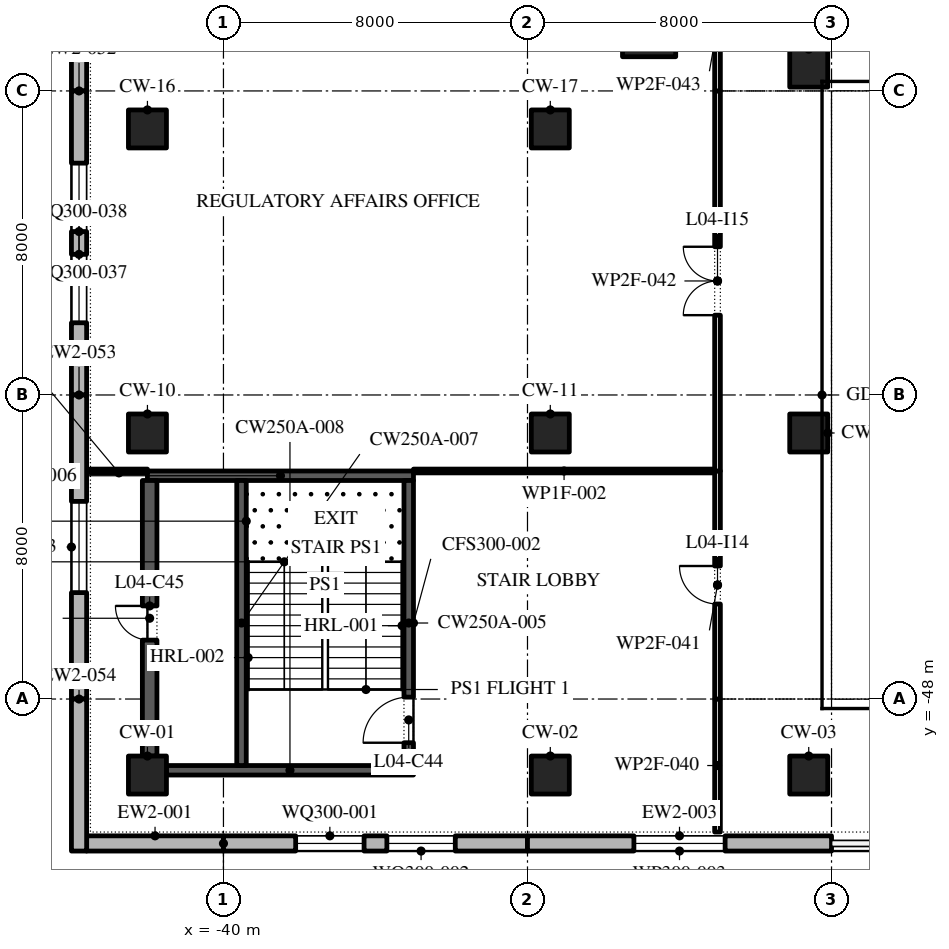
"""IFC4 building model, lengths in metres.
Left out: names, types, materials, properties, quantities, classifications, styles, units other than length and angle.
Written with IfcOpenShell. Run it as: python <this file> out.ifc"""

import sys

from ifc_helpers import new_model, si_unit, direction, frame, frame_2d, origin, origin_2d, place, context, subcontext, project, spatial, polyline, rectangle, outline, extrude, element, fill, save


model = new_model("IFC4")
c1 = context("Model", 3, precision=1e-05, world=origin(), true_north=direction((0.0, 1.0)))
c2 = subcontext(c1, "Body", "Model", "MODEL_VIEW")
j1 = project(units=[si_unit("LENGTHUNIT", "METRE"), si_unit("PLANEANGLEUNIT", "RADIAN")], contexts=[c1])
p1 = place(None, origin())
s1 = spatial("IfcSite", under=j1, at=p1, CompositionType="ELEMENT")
p2 = place(p1, origin())
s2 = spatial("IfcBuilding", under=s1, at=p2, CompositionType="ELEMENT")
p3 = place(p2, frame((0.0, 0.0, 24.0)))
s3 = spatial("IfcBuildingStorey", under=s2, at=p3, CompositionType="ELEMENT", Elevation=24.0)
for number, where, z_axis, x_axis in (
    (1, (-42.0, -50.0, 0.0), (0.0, 0.0, 1.0), (1.0, 0.0, 0.0)),
    (2, (-31.4, -50.0, 0.0), (0.0, 0.0, 1.0), (1.0, 0.0, 0.0)),
    (3, (-24.6, -50.0, 0.0), (0.0, 0.0, 1.0), (1.0, 0.0, 0.0)),
    (4, (-42.0, -41.0, 0.0), (0.0, 0.0, 1.0), (1.0, 0.0, 0.0)),
    (5, (-31.4, -41.0, 0.0), (0.0, 0.0, 1.0), (1.0, 0.0, 0.0)),
    (6, (-24.6, -41.0, 0.0), (0.0, 0.0, 1.0), (1.0, 0.0, 0.0)),
    (7, (-42.0, -33.0, 0.0), (0.0, 0.0, 1.0), (1.0, 0.0, 0.0)),
    (8, (-31.4, -33.0, 0.0), (0.0, 0.0, 1.0), (1.0, 0.0, 0.0)),
    (9, (-24.6, -31.4, 0.0), (0.0, 0.0, 1.0), (1.0, 0.0, 0.0)),
):
    element("IfcColumn", number, at=place(p3, frame(where, z_axis=z_axis, x_axis=x_axis)), inside=s3, PredefinedType="COLUMN", context=c2, shape_type="SweptSolid", body=[
        extrude(rectangle(XDim=1.0, YDim=1.0, at=origin_2d()), origin(), (0.0, 0.0, 1.0), 4.8),
    ])
p4 = place(p3, frame((-28.8, -30.4, 0.0), z_axis=(0.0, 0.0, 1.0), x_axis=(1.0, 0.0, 0.0)))
e10 = element("IfcColumn", 10, at=p4, inside=s3, PredefinedType="COLUMN", context=c2, shape_type="SweptSolid", body=[
    extrude(rectangle(XDim=1.4, YDim=1.4, at=origin_2d()), origin(), (0.0, 0.0, 1.0), 4.8),
])
p5 = place(p3, frame((-43.6, -51.8, 0.0), z_axis=(0.0, 0.0, 1.0), x_axis=(1.0, 0.0, 0.0)))
e11 = element("IfcWall", 11, at=p5, inside=s3, PredefinedType="STANDARD", context=c2, shape_type="SweptSolid", body=[
    extrude(rectangle(XDim=3.6, YDim=0.4, at=frame_2d((1.8, 0.0))), origin(), (0.0, 0.0, 1.0), 4.5),
])
p6 = place(p3, frame((-40.0, -51.8, 0.0), z_axis=(0.0, 0.0, 1.0), x_axis=(1.0, 0.0, 0.0)))
e12 = element("IfcWall", 12, at=p6, inside=s3, PredefinedType="STANDARD", context=c2, shape_type="SweptSolid", body=[
    extrude(rectangle(XDim=8.0, YDim=0.4, at=frame_2d((4.0, 0.0))), origin(), (0.0, 0.0, 1.0), 4.5),
])
p7 = place(p6, frame((1.9, 0.0, 0.9)))
e13 = element("IfcOpeningElement", 13, at=p7, cuts=e12, PredefinedType="OPENING", context=c2, shape_type="SweptSolid", body=[
    extrude(outline(polyline([(0.0, 0.0), (1.8, 0.0), (1.8, 1.5), (1.785, 1.729), (1.738, 1.954), (1.662, 2.17), (1.558, 2.375), (1.427, 2.563), (1.271, 2.732), (1.095, 2.879), (0.9, 3.0), (0.705, 2.879), (0.529, 2.732), (0.373, 2.563), (0.242, 2.375), (0.138, 2.17), (0.062, 1.954), (0.015, 1.729), (0.0, 1.5), (0.0, 0.0)])), frame((0.0, 0.21, 0.0), z_axis=(0.0, -1.0, 0.0), x_axis=(1.0, 0.0, 0.0)), (0.0, 0.0, 1.0), 0.42),
])
p8 = place(p6, frame((4.3, 0.0, 0.9)))
e14 = element("IfcOpeningElement", 14, at=p8, cuts=e12, PredefinedType="OPENING", context=c2, shape_type="SweptSolid", body=[
    extrude(outline(polyline([(0.0, 0.0), (1.8, 0.0), (1.8, 1.5), (1.785, 1.729), (1.738, 1.954), (1.662, 2.17), (1.558, 2.375), (1.427, 2.563), (1.271, 2.732), (1.095, 2.879), (0.9, 3.0), (0.705, 2.879), (0.529, 2.732), (0.373, 2.563), (0.242, 2.375), (0.138, 2.17), (0.062, 1.954), (0.015, 1.729), (0.0, 1.5), (0.0, 0.0)])), frame((0.0, 0.21, 0.0), z_axis=(0.0, -1.0, 0.0), x_axis=(1.0, 0.0, 0.0)), (0.0, 0.0, 1.0), 0.42),
])
p9 = place(p3, frame((-32.0, -51.8, 0.0), z_axis=(0.0, 0.0, 1.0), x_axis=(1.0, 0.0, 0.0)))
e15 = element("IfcWall", 15, at=p9, inside=s3, PredefinedType="STANDARD", context=c2, shape_type="SweptSolid", body=[
    extrude(rectangle(XDim=8.0, YDim=0.4, at=frame_2d((4.0, 0.0))), origin(), (0.0, 0.0, 1.0), 4.5),
])
p10 = place(p9, frame((2.8, 0.0, 0.9)))
e16 = element("IfcOpeningElement", 16, at=p10, cuts=e15, PredefinedType="OPENING", context=c2, shape_type="SweptSolid", body=[
    extrude(outline(polyline([(0.0, 0.0), (2.4, 0.0), (2.4, 1.5), (2.378, 1.758), (2.313, 2.009), (2.207, 2.245), (2.063, 2.46), (1.885, 2.648), (1.677, 2.804), (1.447, 2.922), (1.2, 3.0), (0.953, 2.922), (0.722, 2.804), (0.515, 2.648), (0.337, 2.46), (0.193, 2.245), (0.087, 2.009), (0.022, 1.758), (0.0, 1.5), (0.0, 0.0)])), frame((0.0, 0.21, 0.0), z_axis=(0.0, -1.0, 0.0), x_axis=(1.0, 0.0, 0.0)), (0.0, 0.0, 1.0), 0.42),
])
p11 = place(p3, frame((-43.8, -24.0, 0.0), z_axis=(0.0, 0.0, 1.0), x_axis=(0.0, -1.0, 0.0)))
e17 = element("IfcWall", 17, at=p11, inside=s3, PredefinedType="STANDARD", context=c2, shape_type="SweptSolid", body=[
    extrude(rectangle(XDim=8.0, YDim=0.4, at=frame_2d((4.0, 0.0))), origin(), (0.0, 0.0, 1.0), 4.5),
])
p12 = place(p11, frame((2.8, 0.0, 0.9)))
e18 = element("IfcOpeningElement", 18, at=p12, cuts=e17, PredefinedType="OPENING", context=c2, shape_type="SweptSolid", body=[
    extrude(outline(polyline([(0.0, 0.0), (2.4, 0.0), (2.4, 1.5), (2.378, 1.758), (2.313, 2.009), (2.207, 2.245), (2.063, 2.46), (1.885, 2.648), (1.677, 2.804), (1.447, 2.922), (1.2, 3.0), (0.953, 2.922), (0.722, 2.804), (0.515, 2.648), (0.337, 2.46), (0.193, 2.245), (0.087, 2.009), (0.022, 1.758), (0.0, 1.5), (0.0, 0.0)])), frame((0.0, 0.21, 0.0), z_axis=(0.0, -1.0, 0.0), x_axis=(1.0, 0.0, 0.0)), (0.0, 0.0, 1.0), 0.42),
])
p13 = place(p3, frame((-43.8, -32.0, 0.0), z_axis=(0.0, 0.0, 1.0), x_axis=(0.0, -1.0, 0.0)))
e19 = element("IfcWall", 19, at=p13, inside=s3, PredefinedType="STANDARD", context=c2, shape_type="SweptSolid", body=[
    extrude(rectangle(XDim=8.0, YDim=0.4, at=frame_2d((4.0, 0.0))), origin(), (0.0, 0.0, 1.0), 4.5),
])
p14 = place(p13, frame((1.9, 0.0, 0.9)))
e20 = element("IfcOpeningElement", 20, at=p14, cuts=e19, PredefinedType="OPENING", context=c2, shape_type="SweptSolid", body=[
    extrude(outline(polyline([(0.0, 0.0), (1.8, 0.0), (1.8, 1.5), (1.785, 1.729), (1.738, 1.954), (1.662, 2.17), (1.558, 2.375), (1.427, 2.563), (1.271, 2.732), (1.095, 2.879), (0.9, 3.0), (0.705, 2.879), (0.529, 2.732), (0.373, 2.563), (0.242, 2.375), (0.138, 2.17), (0.062, 1.954), (0.015, 1.729), (0.0, 1.5), (0.0, 0.0)])), frame((0.0, 0.21, 0.0), z_axis=(0.0, -1.0, 0.0), x_axis=(1.0, 0.0, 0.0)), (0.0, 0.0, 1.0), 0.42),
])
p15 = place(p13, frame((4.3, 0.0, 0.9)))
e21 = element("IfcOpeningElement", 21, at=p15, cuts=e19, PredefinedType="OPENING", context=c2, shape_type="SweptSolid", body=[
    extrude(outline(polyline([(0.0, 0.0), (1.8, 0.0), (1.8, 1.5), (1.785, 1.729), (1.738, 1.954), (1.662, 2.17), (1.558, 2.375), (1.427, 2.563), (1.271, 2.732), (1.095, 2.879), (0.9, 3.0), (0.705, 2.879), (0.529, 2.732), (0.373, 2.563), (0.242, 2.375), (0.138, 2.17), (0.062, 1.954), (0.015, 1.729), (0.0, 1.5), (0.0, 0.0)])), frame((0.0, 0.21, 0.0), z_axis=(0.0, -1.0, 0.0), x_axis=(1.0, 0.0, 0.0)), (0.0, 0.0, 1.0), 0.42),
])
p16 = place(p3, frame((-43.8, -40.0, 0.0), z_axis=(0.0, 0.0, 1.0), x_axis=(0.0, -1.0, 0.0)))
e22 = element("IfcWall", 22, at=p16, inside=s3, PredefinedType="STANDARD", context=c2, shape_type="SweptSolid", body=[
    extrude(rectangle(XDim=8.0, YDim=0.4, at=frame_2d((4.0, 0.0))), origin(), (0.0, 0.0, 1.0), 4.5),
])
p17 = place(p16, frame((2.8, 0.0, 0.9)))
e23 = element("IfcOpeningElement", 23, at=p17, cuts=e22, PredefinedType="OPENING", context=c2, shape_type="SweptSolid", body=[
    extrude(outline(polyline([(0.0, 0.0), (2.4, 0.0), (2.4, 1.5), (2.378, 1.758), (2.313, 2.009), (2.207, 2.245), (2.063, 2.46), (1.885, 2.648), (1.677, 2.804), (1.447, 2.922), (1.2, 3.0), (0.953, 2.922), (0.722, 2.804), (0.515, 2.648), (0.337, 2.46), (0.193, 2.245), (0.087, 2.009), (0.022, 1.758), (0.0, 1.5), (0.0, 0.0)])), frame((0.0, 0.21, 0.0), z_axis=(0.0, -1.0, 0.0), x_axis=(1.0, 0.0, 0.0)), (0.0, 0.0, 1.0), 0.42),
])
p18 = place(p3, frame((-43.8, -48.0, 0.0), z_axis=(0.0, 0.0, 1.0), x_axis=(0.0, -1.0, 0.0)))
e24 = element("IfcWall", 24, at=p18, inside=s3, PredefinedType="STANDARD", context=c2, shape_type="SweptSolid", body=[
    extrude(rectangle(XDim=4.0, YDim=0.4, at=frame_2d((2.0, 0.0))), origin(), (0.0, 0.0, 1.0), 4.5),
])
p19 = place(p3, frame((-41.5, -49.875, 0.0), z_axis=(0.0, 0.0, 1.0), x_axis=(1.0, 0.0, 0.0)))
e25 = element("IfcWall", 25, at=p19, inside=s3, PredefinedType="SHEAR", context=c2, shape_type="SweptSolid", body=[
    extrude(rectangle(XDim=6.5, YDim=0.25, at=frame_2d((3.25, 0.0))), origin(), (0.0, 0.0, 1.0), 4.5),
])
p20 = place(p3, frame((-42.0, -42.125, 0.0), z_axis=(0.0, 0.0, 1.0), x_axis=(1.0, 0.0, 0.0)))
e26 = element("IfcWall", 26, at=p20, inside=s3, PredefinedType="SHEAR", context=c2, shape_type="SweptSolid", body=[
    extrude(rectangle(XDim=7.0, YDim=0.25, at=frame_2d((3.5, 0.0))), origin(), (0.0, 0.0, 1.0), 4.5),
])
p21 = place(p3, frame((-41.942, -49.5, 0.0), z_axis=(0.0, 0.0, 1.0), x_axis=(0.0, 1.0, 0.0)))
e27 = element("IfcWall", 27, at=p21, inside=s3, PredefinedType="SHEAR", context=c2, shape_type="SweptSolid", body=[
    extrude(rectangle(XDim=7.25, YDim=0.384, at=frame_2d((3.625, 0.0))), origin(), (0.0, 0.0, 1.0), 4.5),
])
p22 = place(p21, frame((3.05, 0.0, 0.0)))
e28 = element("IfcOpeningElement", 28, at=p22, cuts=e27, PredefinedType="OPENING", context=c2, shape_type="SweptSolid", body=[
    extrude(rectangle(XDim=0.9, YDim=2.1, at=frame_2d((0.45, 1.05))), frame((0.0, 0.202, 0.0), z_axis=(0.0, -1.0, 0.0), x_axis=(1.0, 0.0, 0.0)), (0.0, 0.0, 1.0), 0.404),
])
p23 = place(p3, frame((-35.125, -49.75, 0.0), z_axis=(0.0, 0.0, 1.0), x_axis=(0.0, 1.0, 0.0)))
e29 = element("IfcWall", 29, at=p23, inside=s3, PredefinedType="SHEAR", context=c2, shape_type="SweptSolid", body=[
    extrude(rectangle(XDim=7.5, YDim=0.25, at=frame_2d((3.75, 0.0))), origin(), (0.0, 0.0, 1.0), 4.5),
])
p24 = place(p23, frame((0.6, 0.0, 0.0)))
e30 = element("IfcOpeningElement", 30, at=p24, cuts=e29, PredefinedType="OPENING", context=c2, shape_type="SweptSolid", body=[
    extrude(rectangle(XDim=1.2, YDim=2.1, at=frame_2d((0.6, 1.05))), frame((0.0, 0.135, 0.0), z_axis=(0.0, -1.0, 0.0), x_axis=(1.0, 0.0, 0.0)), (0.0, 0.0, 1.0), 0.27),
])
p25 = place(p3, frame((-39.525, -49.75, 0.0), z_axis=(0.0, 0.0, 1.0), x_axis=(0.0, 1.0, 0.0)))
e31 = element("IfcWall", 31, at=p25, inside=s3, PredefinedType="SHEAR", context=c2, shape_type="SweptSolid", body=[
    extrude(rectangle(XDim=7.5, YDim=0.25, at=frame_2d((3.75, 0.0))), origin(), (0.0, 0.0, 1.0), 4.5),
])
p26 = place(p3, frame((-43.5, -42.0, 0.0), z_axis=(0.0, 0.0, 1.0), x_axis=(1.0, 0.0, 0.0)))
e32 = element("IfcWall", 32, at=p26, inside=s3, PredefinedType="PARTITIONING", context=c2, shape_type="SweptSolid", body=[
    extrude(rectangle(XDim=1.5, YDim=0.1, at=frame_2d((0.75, 0.0))), origin(), (0.0, 0.0, 1.0), 4.5),
])
p27 = place(p3, frame((-35.0, -42.0, 0.0), z_axis=(0.0, 0.0, 1.0), x_axis=(1.0, 0.0, 0.0)))
e33 = element("IfcWall", 33, at=p27, inside=s3, PredefinedType="PARTITIONING", context=c2, shape_type="SweptSolid", body=[
    extrude(rectangle(XDim=7.925, YDim=0.1, at=frame_2d((3.962, 0.0))), origin(), (0.0, 0.0, 1.0), 4.5),
])
p28 = place(p3, frame((-27.0, -51.5, 0.0), z_axis=(0.0, 0.0, 1.0), x_axis=(0.0, 1.0, 0.0)))
e34 = element("IfcWall", 34, at=p28, inside=s3, PredefinedType="PARTITIONING", context=c2, shape_type="SweptSolid", body=[
    extrude(rectangle(XDim=3.5, YDim=0.15, at=frame_2d((1.75, 0.0))), origin(), (0.0, 0.0, 1.0), 4.5),
])
p29 = place(p3, frame((-27.0, -48.0, 0.0), z_axis=(0.0, 0.0, 1.0), x_axis=(0.0, 1.0, 0.0)))
e35 = element("IfcWall", 35, at=p29, inside=s3, PredefinedType="PARTITIONING", context=c2, shape_type="SweptSolid", body=[
    extrude(rectangle(XDim=6.0, YDim=0.15, at=frame_2d((3.0, 0.0))), origin(), (0.0, 0.0, 1.0), 4.5),
])
p30 = place(p29, frame((2.5, 0.0, 0.0)))
e36 = element("IfcOpeningElement", 36, at=p30, cuts=e35, PredefinedType="OPENING", context=c2, shape_type="SweptSolid", body=[
    extrude(rectangle(XDim=1.0, YDim=2.1, at=frame_2d((0.5, 1.05))), frame((0.0, 0.085, 0.0), z_axis=(0.0, -1.0, 0.0), x_axis=(1.0, 0.0, 0.0)), (0.0, 0.0, 1.0), 0.17),
])
p31 = place(p3, frame((-27.0, -42.0, 0.0), z_axis=(0.0, 0.0, 1.0), x_axis=(0.0, 1.0, 0.0)))
e37 = element("IfcWall", 37, at=p31, inside=s3, PredefinedType="PARTITIONING", context=c2, shape_type="SweptSolid", body=[
    extrude(rectangle(XDim=10.0, YDim=0.15, at=frame_2d((5.0, 0.0))), origin(), (0.0, 0.0, 1.0), 4.5),
])
p32 = place(p31, frame((4.1, 0.0, 0.0)))
e38 = element("IfcOpeningElement", 38, at=p32, cuts=e37, PredefinedType="OPENING", context=c2, shape_type="SweptSolid", body=[
    extrude(rectangle(XDim=1.8, YDim=2.1, at=frame_2d((0.9, 1.05))), frame((0.0, 0.085, 0.0), z_axis=(0.0, -1.0, 0.0), x_axis=(1.0, 0.0, 0.0)), (0.0, 0.0, 1.0), 0.17),
])
p33 = place(p3, frame((-27.0, -32.0, 0.0), z_axis=(0.0, 0.0, 1.0), x_axis=(0.0, 1.0, 0.0)))
e39 = element("IfcWall", 39, at=p33, inside=s3, PredefinedType="PARTITIONING", context=c2, shape_type="SweptSolid", body=[
    extrude(rectangle(XDim=3.425, YDim=0.15, at=frame_2d((1.712, 0.0))), origin(), (0.0, 0.0, 1.0), 4.5),
])
p34 = place(p7, origin())
e40 = element("IfcWindow", 40, at=p34, inside=s3, PartitioningType="DOUBLE_PANEL_VERTICAL", PredefinedType="WINDOW", context=c2, shape_type="SweptSolid", body=[
    extrude(outline(polyline([(0.0, 0.0), (1.8, 0.0), (1.8, 1.5), (1.785, 1.729), (1.738, 1.954), (1.662, 2.17), (1.558, 2.375), (1.427, 2.563), (1.271, 2.732), (1.095, 2.879), (0.9, 3.0), (0.705, 2.879), (0.529, 2.732), (0.373, 2.563), (0.242, 2.375), (0.138, 2.17), (0.062, 1.954), (0.015, 1.729), (0.0, 1.5), (0.0, 0.0)])), frame((0.0, 0.03, 0.0), z_axis=(0.0, -1.0, 0.0), x_axis=(1.0, 0.0, 0.0)), (0.0, 0.0, 1.0), 0.06),
])
fill(e13, e40)
p35 = place(p8, origin())
e41 = element("IfcWindow", 41, at=p35, inside=s3, PartitioningType="DOUBLE_PANEL_VERTICAL", PredefinedType="WINDOW", context=c2, shape_type="SweptSolid", body=[
    extrude(outline(polyline([(0.0, 0.0), (1.8, 0.0), (1.8, 1.5), (1.785, 1.729), (1.738, 1.954), (1.662, 2.17), (1.558, 2.375), (1.427, 2.563), (1.271, 2.732), (1.095, 2.879), (0.9, 3.0), (0.705, 2.879), (0.529, 2.732), (0.373, 2.563), (0.242, 2.375), (0.138, 2.17), (0.062, 1.954), (0.015, 1.729), (0.0, 1.5), (0.0, 0.0)])), frame((0.0, 0.03, 0.0), z_axis=(0.0, -1.0, 0.0), x_axis=(1.0, 0.0, 0.0)), (0.0, 0.0, 1.0), 0.06),
])
fill(e14, e41)
p36 = place(p10, origin())
e42 = element("IfcWindow", 42, at=p36, inside=s3, PartitioningType="DOUBLE_PANEL_VERTICAL", PredefinedType="WINDOW", context=c2, shape_type="SweptSolid", body=[
    extrude(outline(polyline([(0.0, 0.0), (2.4, 0.0), (2.4, 1.5), (2.378, 1.758), (2.313, 2.009), (2.207, 2.245), (2.063, 2.46), (1.885, 2.648), (1.677, 2.804), (1.447, 2.922), (1.2, 3.0), (0.953, 2.922), (0.722, 2.804), (0.515, 2.648), (0.337, 2.46), (0.193, 2.245), (0.087, 2.009), (0.022, 1.758), (0.0, 1.5), (0.0, 0.0)])), frame((0.0, 0.03, 0.0), z_axis=(0.0, -1.0, 0.0), x_axis=(1.0, 0.0, 0.0)), (0.0, 0.0, 1.0), 0.06),
])
fill(e16, e42)
p37 = place(p14, origin())
e43 = element("IfcWindow", 43, at=p37, inside=s3, PartitioningType="DOUBLE_PANEL_VERTICAL", PredefinedType="WINDOW", context=c2, shape_type="SweptSolid", body=[
    extrude(outline(polyline([(0.0, 0.0), (1.8, 0.0), (1.8, 1.5), (1.785, 1.729), (1.738, 1.954), (1.662, 2.17), (1.558, 2.375), (1.427, 2.563), (1.271, 2.732), (1.095, 2.879), (0.9, 3.0), (0.705, 2.879), (0.529, 2.732), (0.373, 2.563), (0.242, 2.375), (0.138, 2.17), (0.062, 1.954), (0.015, 1.729), (0.0, 1.5), (0.0, 0.0)])), frame((0.0, 0.03, 0.0), z_axis=(0.0, -1.0, 0.0), x_axis=(1.0, 0.0, 0.0)), (0.0, 0.0, 1.0), 0.06),
])
fill(e20, e43)
p38 = place(p15, origin())
e44 = element("IfcWindow", 44, at=p38, inside=s3, PartitioningType="DOUBLE_PANEL_VERTICAL", PredefinedType="WINDOW", context=c2, shape_type="SweptSolid", body=[
    extrude(outline(polyline([(0.0, 0.0), (1.8, 0.0), (1.8, 1.5), (1.785, 1.729), (1.738, 1.954), (1.662, 2.17), (1.558, 2.375), (1.427, 2.563), (1.271, 2.732), (1.095, 2.879), (0.9, 3.0), (0.705, 2.879), (0.529, 2.732), (0.373, 2.563), (0.242, 2.375), (0.138, 2.17), (0.062, 1.954), (0.015, 1.729), (0.0, 1.5), (0.0, 0.0)])), frame((0.0, 0.03, 0.0), z_axis=(0.0, -1.0, 0.0), x_axis=(1.0, 0.0, 0.0)), (0.0, 0.0, 1.0), 0.06),
])
fill(e21, e44)
p39 = place(p17, origin())
e45 = element("IfcWindow", 45, at=p39, inside=s3, PartitioningType="DOUBLE_PANEL_VERTICAL", PredefinedType="WINDOW", context=c2, shape_type="SweptSolid", body=[
    extrude(outline(polyline([(0.0, 0.0), (2.4, 0.0), (2.4, 1.5), (2.378, 1.758), (2.313, 2.009), (2.207, 2.245), (2.063, 2.46), (1.885, 2.648), (1.677, 2.804), (1.447, 2.922), (1.2, 3.0), (0.953, 2.922), (0.722, 2.804), (0.515, 2.648), (0.337, 2.46), (0.193, 2.245), (0.087, 2.009), (0.022, 1.758), (0.0, 1.5), (0.0, 0.0)])), frame((0.0, 0.03, 0.0), z_axis=(0.0, -1.0, 0.0), x_axis=(1.0, 0.0, 0.0)), (0.0, 0.0, 1.0), 0.06),
])
fill(e23, e45)
p40 = place(p24, origin())
e46 = element("IfcDoor", 46, at=p40, inside=s3, OperationType="SINGLE_SWING_RIGHT", PredefinedType="DOOR", context=c2, shape_type="SweptSolid", body=[
    extrude(rectangle(XDim=1.2, YDim=2.1, at=frame_2d((0.6, 1.05))), frame((0.0, 0.025, 0.0), z_axis=(0.0, -1.0, 0.0), x_axis=(1.0, 0.0, 0.0)), (0.0, 0.0, 1.0), 0.05),
])
fill(e30, e46)
p41 = place(p22, origin())
e47 = element("IfcDoor", 47, at=p41, inside=s3, OperationType="SINGLE_SWING_LEFT", PredefinedType="DOOR", context=c2, shape_type="SweptSolid", body=[
    extrude(rectangle(XDim=0.9, YDim=2.1, at=frame_2d((0.45, 1.05))), frame((0.0, -0.142, 0.0), z_axis=(0.0, -1.0, 0.0), x_axis=(1.0, 0.0, 0.0)), (0.0, 0.0, 1.0), 0.05),
])
fill(e28, e47)
p42 = place(p30, origin())
e48 = element("IfcDoor", 48, at=p42, inside=s3, OperationType="SINGLE_SWING_LEFT", PredefinedType="DOOR", context=c2, shape_type="SweptSolid", body=[
    extrude(rectangle(XDim=1.0, YDim=2.1, at=frame_2d((0.5, 1.05))), frame((0.0, 0.025, 0.0), z_axis=(0.0, -1.0, 0.0), x_axis=(1.0, 0.0, 0.0)), (0.0, 0.0, 1.0), 0.05),
])
fill(e36, e48)
p43 = place(p32, origin())
e49 = element("IfcDoor", 49, at=p43, inside=s3, OperationType="SINGLE_SWING_LEFT", PredefinedType="DOOR", context=c2, shape_type="SweptSolid", body=[
    extrude(rectangle(XDim=1.8, YDim=2.1, at=frame_2d((0.9, 1.05))), frame((0.0, 0.025, 0.0), z_axis=(0.0, -1.0, 0.0), x_axis=(1.0, 0.0, 0.0)), (0.0, 0.0, 1.0), 0.05),
])
fill(e38, e49)
save(model, sys.argv[1])
